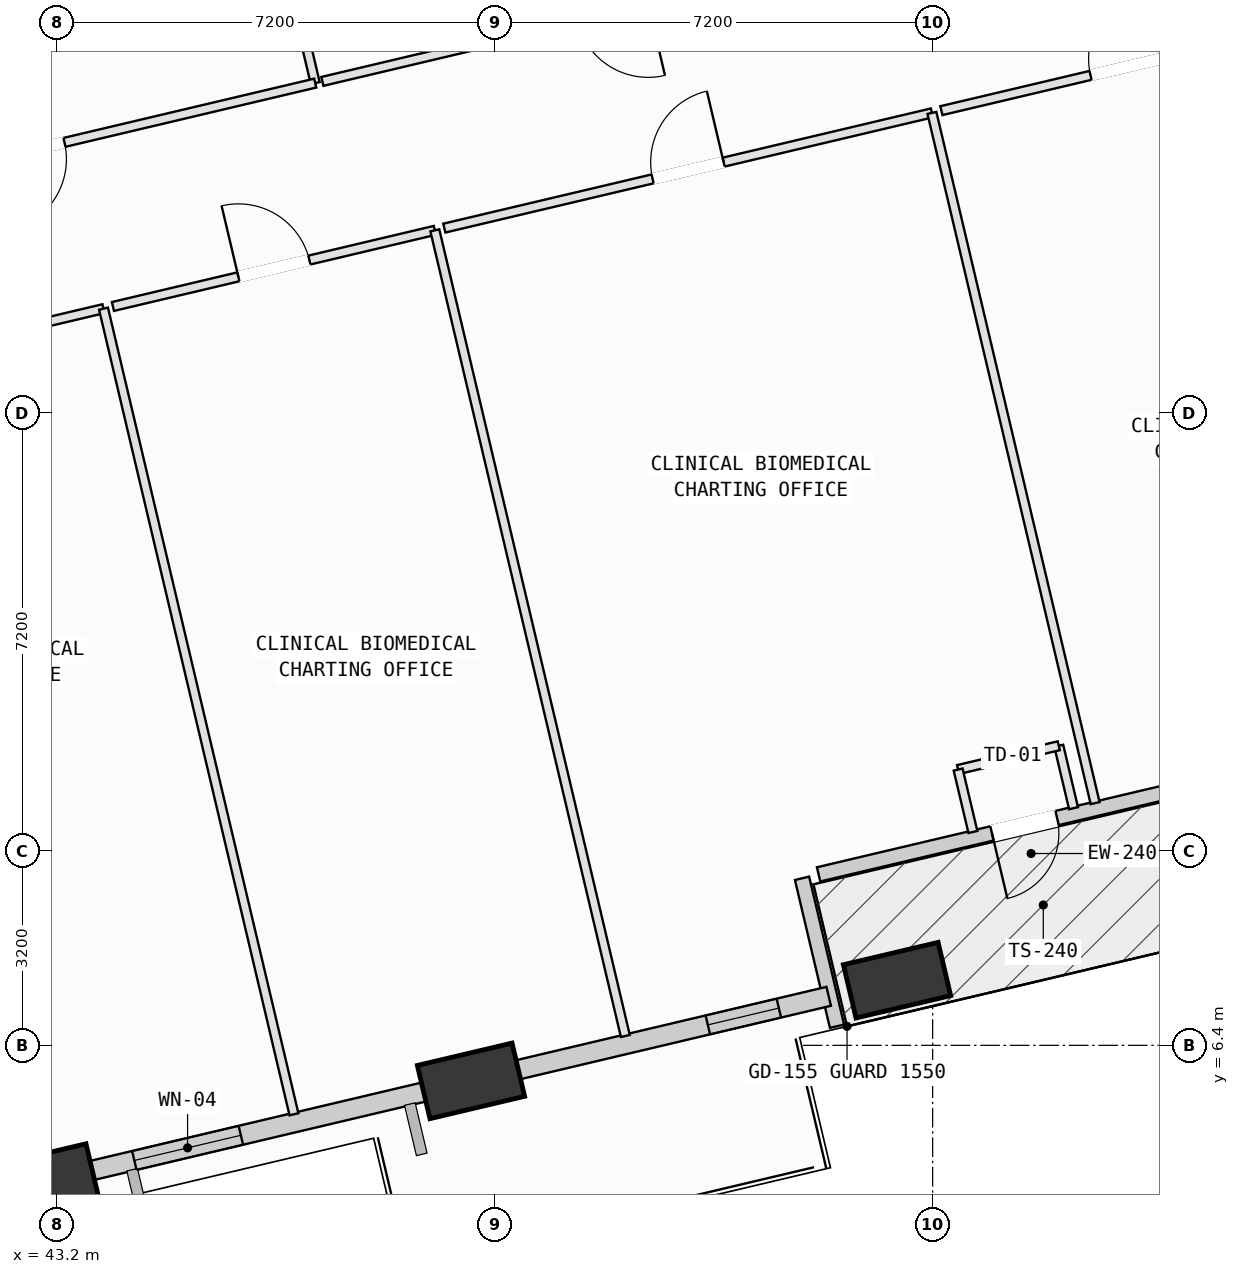
"""IFC4 building model, lengths in metres.
Left out: names, types, materials, properties, quantities, classifications, styles, units other than length and angle.
Written with IfcOpenShell. Run it as: python <this file> out.ifc"""

import sys

from ifc_helpers import new_model, si_unit, direction, frame, frame_2d, origin, origin_2d, place, context, subcontext, project, spatial, rectangle, extrude, element, fill, save


model = new_model("IFC4")
c1 = context("Model", 3, precision=1e-05, world=origin(), true_north=direction((0.0, 1.0)))
c2 = subcontext(c1, "Body", "Model", "MODEL_VIEW")
j1 = project(units=[si_unit("LENGTHUNIT", "METRE"), si_unit("PLANEANGLEUNIT", "RADIAN")], contexts=[c1])
p1 = place(None, origin())
s1 = spatial("IfcSite", under=j1, at=p1, CompositionType="ELEMENT")
p2 = place(p1, origin())
s2 = spatial("IfcBuilding", under=s1, at=p2, CompositionType="ELEMENT")
p3 = place(p2, frame((0.0, 0.0, 79.0)))
s3 = spatial("IfcBuildingStorey", under=s2, at=p3, CompositionType="ELEMENT", Elevation=79.0)
p4 = place(p3, frame((43.001, 4.159, 0.002), z_axis=(0.084881179717, 0.039446599156, 0.995609939256), x_axis=(-0.617843296681, 0.786006368536, 0.021532518815)))
e1 = element("IfcColumn", 1, at=p4, inside=s3, PredefinedType="COLUMN", context=c2, shape_type="SweptSolid", body=[
    extrude(rectangle(XDim=1.6, YDim=0.9, at=origin_2d()), origin(), (0.0, 0.0, 1.0), 3.955),
])
p5 = place(p3, frame((50.008, 5.815, 0.002), z_axis=(0.077702832451, 0.068314254921, 0.994633315551), x_axis=(-0.814413568404, 0.579796535896, 0.023801608418)))
e2 = element("IfcColumn", 2, at=p5, inside=s3, PredefinedType="COLUMN", context=c2, shape_type="SweptSolid", body=[
    extrude(rectangle(XDim=1.6, YDim=0.9, at=origin_2d()), origin(), (0.0, 0.0, 1.0), 3.953),
])
p6 = place(p3, frame((57.014, 7.472, 0.002), z_axis=(0.070529421211, 0.096923867186, 0.992789688058), x_axis=(-0.921275075012, 0.387932734604, 0.027575887724)))
e3 = element("IfcColumn", 3, at=p6, inside=s3, PredefinedType="COLUMN", context=c2, shape_type="SweptSolid", body=[
    extrude(rectangle(XDim=1.6, YDim=0.9, at=origin_2d()), origin(), (0.0, 0.0, 1.0), 3.95),
])
p7 = place(p3, frame((62.498, 10.813, 0.0), z_axis=(0.0, 0.0, 1.0), x_axis=(-0.973180186611, -0.230044179209, 0.0)))
e4 = element("IfcWall", 4, at=p7, inside=s3, PredefinedType="SOLIDWALL", context=c2, shape_type="SweptSolid", body=[
    extrude(rectangle(XDim=6.96, YDim=0.24, at=frame_2d((3.48, 0.0))), origin(), (0.0, 0.0, 1.0), 3.085),
])
p8 = place(p7, frame((2.93, 0.0, 0.0)))
e5 = element("IfcOpeningElement", 5, at=p8, cuts=e4, PredefinedType="OPENING", context=c2, shape_type="SweptSolid", body=[
    extrude(rectangle(XDim=1.1, YDim=2.15, at=frame_2d((0.55, 1.075))), frame((0.0, 0.13, 0.0), z_axis=(0.0, -1.0, 0.0), x_axis=(1.0, 0.0, 0.0)), (0.0, 0.0, 1.0), 0.26),
])
p9 = place(p3, frame((55.452, 9.147, 0.0), z_axis=(0.0, 0.0, 1.0), x_axis=(0.230084311785, -0.97317069904, 0.0)))
e6 = element("IfcWall", 6, at=p9, inside=s3, PredefinedType="SOLIDWALL", context=c2, shape_type="SweptSolid", body=[
    extrude(rectangle(XDim=2.5, YDim=0.24, at=frame_2d((1.25, 0.0))), origin(), (0.0, 0.0, 1.0), 3.085),
])
p10 = place(p3, frame((49.602, 5.719, 0.0), z_axis=(0.0, 0.0, 1.0), x_axis=(-0.973177813983, -0.230054216157, 0.0)))
e7 = element("IfcWall", 7, at=p10, inside=s3, PredefinedType="SOLIDWALL", context=c2, shape_type="SweptSolid", body=[
    extrude(rectangle(XDim=5.993, YDim=0.32, at=frame_2d((2.996, 0.0))), origin(), (0.0, 0.0, 1.0), 3.085),
])
p11 = place(p10, frame((3.473, 0.0, 0.75)))
e8 = element("IfcOpeningElement", 8, at=p11, cuts=e7, PredefinedType="OPENING", context=c2, shape_type="SweptSolid", body=[
    extrude(rectangle(XDim=1.8, YDim=2.05, at=frame_2d((0.9, 1.025))), frame((0.0, 0.17, 0.0), z_axis=(0.0, -1.0, 0.0), x_axis=(1.0, 0.0, 0.0)), (0.0, 0.0, 1.0), 0.34),
])
p12 = place(p3, frame((55.89, 7.206, 0.0), z_axis=(0.0, 0.0, 1.0), x_axis=(-0.973176868971, -0.23005821372, 0.0)))
e9 = element("IfcWall", 9, at=p12, inside=s3, PredefinedType="SOLIDWALL", context=c2, shape_type="SweptSolid", body=[
    extrude(rectangle(XDim=5.261, YDim=0.32, at=frame_2d((2.631, 0.0))), origin(), (0.0, 0.0, 1.0), 3.085),
])
p13 = place(p12, frame((0.843, 0.0, 0.75)))
e10 = element("IfcOpeningElement", 10, at=p13, cuts=e9, PredefinedType="OPENING", context=c2, shape_type="SweptSolid", body=[
    extrude(rectangle(XDim=1.2, YDim=1.75, at=frame_2d((0.6, 0.875))), frame((0.0, 0.17, 0.0), z_axis=(0.0, -1.0, 0.0), x_axis=(1.0, 0.0, 0.0)), (0.0, 0.0, 1.0), 0.34),
])
p14 = place(p3, frame((36.5, 16.751, 0.0), z_axis=(0.0, 0.0, 1.0), x_axis=(0.973158565996, 0.230135623987, 0.0)))
e11 = element("IfcWall", 11, at=p14, inside=s3, PredefinedType="PARTITIONING", context=c2, shape_type="SweptSolid", body=[
    extrude(rectangle(XDim=7.67, YDim=0.15, at=frame_2d((3.835, 0.0))), origin(), (0.0, 0.0, 1.0), 3.7),
])
p15 = place(p14, frame((3.235, 0.0, 0.0)))
e12 = element("IfcOpeningElement", 12, at=p15, cuts=e11, PredefinedType="OPENING", context=c2, shape_type="SweptSolid", body=[
    extrude(rectangle(XDim=1.2, YDim=2.15, at=frame_2d((0.6, 1.075))), frame((0.0, 0.085, 0.0), z_axis=(0.0, -1.0, 0.0), x_axis=(1.0, 0.0, 0.0)), (0.0, 0.0, 1.0), 0.17),
])
p16 = place(p3, frame((43.964, 18.516, 0.0), z_axis=(0.0, 0.0, 1.0), x_axis=(0.230026689043, -0.97318432084, 0.0)))
e13 = element("IfcWall", 13, at=p16, inside=s3, PredefinedType="PARTITIONING", context=c2, shape_type="SweptSolid", body=[
    extrude(rectangle(XDim=13.615, YDim=0.15, at=frame_2d((6.808, 0.0))), origin(), (0.0, 0.0, 1.0), 3.7),
])
p17 = place(p3, frame((43.823, 4.117, 0.0), z_axis=(0.0, 0.0, 1.0), x_axis=(-0.973197713675, -0.229970019998, 0.0)))
e14 = element("IfcWall", 14, at=p17, inside=s3, PredefinedType="PARTITIONING", context=c2, shape_type="SweptSolid", body=[
    extrude(rectangle(XDim=1.213, YDim=0.15, at=frame_2d((0.607, 0.0))), origin(), (0.0, 0.0, 1.0), 3.085),
])
p18 = place(p3, frame((44.119, 18.552, 0.0), z_axis=(0.0, 0.0, 1.0), x_axis=(0.973159948665, 0.230129777116, 0.0)))
e15 = element("IfcWall", 15, at=p18, inside=s3, PredefinedType="PARTITIONING", context=c2, shape_type="SweptSolid", body=[
    extrude(rectangle(XDim=5.44, YDim=0.15, at=frame_2d((2.72, 0.0))), origin(), (0.0, 0.0, 1.0), 3.7),
])
p19 = place(p18, frame((2.12, 0.0, 0.0)))
e16 = element("IfcOpeningElement", 16, at=p19, cuts=e15, PredefinedType="OPENING", context=c2, shape_type="SweptSolid", body=[
    extrude(rectangle(XDim=1.2, YDim=2.15, at=frame_2d((0.6, 1.075))), frame((0.0, 0.085, 0.0), z_axis=(0.0, -1.0, 0.0), x_axis=(1.0, 0.0, 0.0)), (0.0, 0.0, 1.0), 0.17),
])
p20 = place(p3, frame((49.413, 19.804, 0.0), z_axis=(0.0, 0.0, 1.0), x_axis=(0.230094618591, -0.97316826217, 0.0)))
e17 = element("IfcWall", 17, at=p20, inside=s3, PredefinedType="PARTITIONING", context=c2, shape_type="SweptSolid", body=[
    extrude(rectangle(XDim=13.615, YDim=0.15, at=frame_2d((6.808, 0.0))), origin(), (0.0, 0.0, 1.0), 3.7),
])
p21 = place(p3, frame((50.823, 5.772, 0.0), z_axis=(0.0, 0.0, 1.0), x_axis=(-0.973219377469, -0.229878322855, 0.0)))
e18 = element("IfcWall", 18, at=p21, inside=s3, PredefinedType="PARTITIONING", context=c2, shape_type="SweptSolid", body=[
    extrude(rectangle(XDim=1.2, YDim=0.15, at=frame_2d((0.6, 0.0))), origin(), (0.0, 0.0, 1.0), 3.085),
])
p22 = place(p3, frame((49.569, 19.841, 0.0), z_axis=(0.0, 0.0, 1.0), x_axis=(0.973193656839, 0.229987187224, 0.0)))
e19 = element("IfcWall", 19, at=p22, inside=s3, PredefinedType="PARTITIONING", context=c2, shape_type="SweptSolid", body=[
    extrude(rectangle(XDim=8.24, YDim=0.15, at=frame_2d((4.12, 0.0))), origin(), (0.0, 0.0, 1.0), 3.7),
])
p23 = place(p22, frame((3.52, 0.0, 0.0)))
e20 = element("IfcOpeningElement", 20, at=p23, cuts=e19, PredefinedType="OPENING", context=c2, shape_type="SweptSolid", body=[
    extrude(rectangle(XDim=1.2, YDim=2.15, at=frame_2d((0.6, 1.075))), frame((0.0, 0.085, 0.0), z_axis=(0.0, -1.0, 0.0), x_axis=(1.0, 0.0, 0.0)), (0.0, 0.0, 1.0), 0.17),
])
p24 = place(p3, frame((57.588, 21.736, 0.0), z_axis=(0.0, 0.0, 1.0), x_axis=(0.230096091154, -0.973167913998, 0.0)))
e21 = element("IfcWall", 21, at=p24, inside=s3, PredefinedType="PARTITIONING", context=c2, shape_type="SweptSolid", body=[
    extrude(rectangle(XDim=11.665, YDim=0.15, at=frame_2d((5.833, 0.0))), origin(), (0.0, 0.0, 1.0), 3.7),
])
p25 = place(p3, frame((59.917, 10.3, 0.0), z_axis=(0.0, 0.0, 1.0), x_axis=(-0.230212703989, 0.97314033465, 0.0)))
e22 = element("IfcWall", 22, at=p25, inside=s3, PredefinedType="PARTITIONING", context=c2, shape_type="SweptSolid", body=[
    extrude(rectangle(XDim=1.055, YDim=0.15, at=frame_2d((0.528, 0.0))), origin(), (0.0, 0.0, 1.0), 3.7),
])
p26 = place(p3, frame((59.674, 11.327, 0.0), z_axis=(0.0, 0.0, 1.0), x_axis=(-0.973226668125, -0.229847454738, 0.0)))
e23 = element("IfcWall", 23, at=p26, inside=s3, PredefinedType="PARTITIONING", context=c2, shape_type="SweptSolid", body=[
    extrude(rectangle(XDim=1.7, YDim=0.15, at=frame_2d((0.85, 0.0))), origin(), (0.0, 0.0, 1.0), 3.7),
])
p27 = place(p3, frame((58.019, 10.936, 0.0), z_axis=(0.0, 0.0, 1.0), x_axis=(0.230160881779, -0.973152592607, 0.0)))
e24 = element("IfcWall", 24, at=p27, inside=s3, PredefinedType="PARTITIONING", context=c2, shape_type="SweptSolid", body=[
    extrude(rectangle(XDim=1.055, YDim=0.15, at=frame_2d((0.528, 0.0))), origin(), (0.0, 0.0, 1.0), 3.7),
])
p28 = place(p3, frame((57.744, 21.773, 0.0), z_axis=(0.0, 0.0, 1.0), x_axis=(0.973163112175, 0.230116399028, 0.0)))
e25 = element("IfcWall", 25, at=p28, inside=s3, PredefinedType="PARTITIONING", context=c2, shape_type="SweptSolid", body=[
    extrude(rectangle(XDim=6.24, YDim=0.15, at=frame_2d((3.12, 0.0))), origin(), (0.0, 0.0, 1.0), 3.7),
])
p29 = place(p28, frame((2.52, 0.0, 0.0)))
e26 = element("IfcOpeningElement", 26, at=p29, cuts=e25, PredefinedType="OPENING", context=c2, shape_type="SweptSolid", body=[
    extrude(rectangle(XDim=1.2, YDim=2.15, at=frame_2d((0.6, 1.075))), frame((0.0, 0.085, 0.0), z_axis=(0.0, -1.0, 0.0), x_axis=(1.0, 0.0, 0.0)), (0.0, 0.0, 1.0), 0.17),
])
p30 = place(p3, frame((46.479, 26.319, 0.0), z_axis=(0.0, 0.0, 1.0), x_axis=(0.229935488388, -0.973205872968, 0.0)))
e27 = element("IfcWall", 27, at=p30, inside=s3, PredefinedType="PARTITIONING", context=c2, shape_type="SweptSolid", body=[
    extrude(rectangle(XDim=4.206, YDim=0.15, at=frame_2d((2.103, 0.0))), origin(), (0.0, 0.0, 1.0), 3.7),
])
p31 = place(p3, frame((47.446, 22.226, 0.0), z_axis=(0.0, 0.0, 1.0), x_axis=(-0.973173725455, -0.230071510804, 0.0)))
e28 = element("IfcWall", 28, at=p31, inside=s3, PredefinedType="PARTITIONING", context=c2, shape_type="SweptSolid", body=[
    extrude(rectangle(XDim=9.676, YDim=0.15, at=frame_2d((4.838, 0.0))), origin(), (0.0, 0.0, 1.0), 3.7),
])
p32 = place(p31, frame((4.238, 0.0, 0.0)))
e29 = element("IfcOpeningElement", 29, at=p32, cuts=e28, PredefinedType="OPENING", context=c2, shape_type="SweptSolid", body=[
    extrude(rectangle(XDim=1.2, YDim=2.15, at=frame_2d((0.6, 1.075))), frame((0.0, 0.085, 0.0), z_axis=(0.0, -1.0, 0.0), x_axis=(1.0, 0.0, 0.0)), (0.0, 0.0, 1.0), 0.17),
])
p33 = place(p3, frame((57.113, 24.511, 0.0), z_axis=(0.0, 0.0, 1.0), x_axis=(-0.973189270561, -0.230005747024, 0.0)))
e30 = element("IfcWall", 30, at=p33, inside=s3, PredefinedType="PARTITIONING", context=c2, shape_type="SweptSolid", body=[
    extrude(rectangle(XDim=9.813, YDim=0.15, at=frame_2d((4.907, 0.0))), origin(), (0.0, 0.0, 1.0), 3.7),
])
p34 = place(p33, frame((4.306, 0.0, 0.0)))
e31 = element("IfcOpeningElement", 31, at=p34, cuts=e30, PredefinedType="OPENING", context=c2, shape_type="SweptSolid", body=[
    extrude(rectangle(XDim=1.2, YDim=2.15, at=frame_2d((0.6, 1.075))), frame((0.0, 0.085, 0.0), z_axis=(0.0, -1.0, 0.0), x_axis=(1.0, 0.0, 0.0)), (0.0, 0.0, 1.0), 0.17),
])
p35 = place(p8, origin())
e32 = element("IfcDoor", 32, at=p35, inside=s3, OperationType="SINGLE_SWING_RIGHT", PredefinedType="DOOR", context=c2, shape_type="SweptSolid", body=[
    extrude(rectangle(XDim=1.1, YDim=2.15, at=frame_2d((0.55, 1.075))), frame((0.0, 0.025, 0.0), z_axis=(0.0, -1.0, 0.0), x_axis=(1.0, 0.0, 0.0)), (0.0, 0.0, 1.0), 0.05),
])
fill(e5, e32)
p36 = place(p11, origin())
e33 = element("IfcWindow", 33, at=p36, inside=s3, PartitioningType="SINGLE_PANEL", PredefinedType="WINDOW", context=c2, shape_type="SweptSolid", body=[
    extrude(rectangle(XDim=1.8, YDim=2.05, at=frame_2d((0.9, 1.025))), frame((0.0, 0.03, 0.0), z_axis=(0.0, -1.0, 0.0), x_axis=(1.0, 0.0, 0.0)), (0.0, 0.0, 1.0), 0.06),
])
fill(e8, e33)
p37 = place(p13, origin())
e34 = element("IfcWindow", 34, at=p37, inside=s3, PartitioningType="SINGLE_PANEL", PredefinedType="WINDOW", context=c2, shape_type="SweptSolid", body=[
    extrude(rectangle(XDim=1.2, YDim=1.75, at=frame_2d((0.6, 0.875))), frame((0.0, 0.03, 0.0), z_axis=(0.0, -1.0, 0.0), x_axis=(1.0, 0.0, 0.0)), (0.0, 0.0, 1.0), 0.06),
])
fill(e10, e34)
p38 = place(p19, origin())
e35 = element("IfcDoor", 35, at=p38, inside=s3, OperationType="SINGLE_SWING_LEFT", PredefinedType="DOOR", context=c2, shape_type="SweptSolid", body=[
    extrude(rectangle(XDim=1.2, YDim=2.15, at=frame_2d((0.6, 1.075))), frame((0.0, 0.025, 0.0), z_axis=(0.0, -1.0, 0.0), x_axis=(1.0, 0.0, 0.0)), (0.0, 0.0, 1.0), 0.05),
])
fill(e16, e35)
p39 = place(p23, origin())
e36 = element("IfcDoor", 36, at=p39, inside=s3, OperationType="SINGLE_SWING_RIGHT", PredefinedType="DOOR", context=c2, shape_type="SweptSolid", body=[
    extrude(rectangle(XDim=1.2, YDim=2.15, at=frame_2d((0.6, 1.075))), frame((0.0, 0.025, 0.0), z_axis=(0.0, -1.0, 0.0), x_axis=(1.0, 0.0, 0.0)), (0.0, 0.0, 1.0), 0.05),
])
fill(e20, e36)
p40 = place(p29, origin())
e37 = element("IfcDoor", 37, at=p40, inside=s3, OperationType="SINGLE_SWING_RIGHT", PredefinedType="DOOR", context=c2, shape_type="SweptSolid", body=[
    extrude(rectangle(XDim=1.2, YDim=2.15, at=frame_2d((0.6, 1.075))), frame((0.0, 0.025, 0.0), z_axis=(0.0, -1.0, 0.0), x_axis=(1.0, 0.0, 0.0)), (0.0, 0.0, 1.0), 0.05),
])
fill(e26, e37)
p41 = place(p32, origin())
e38 = element("IfcDoor", 38, at=p41, inside=s3, OperationType="SINGLE_SWING_RIGHT", PredefinedType="DOOR", context=c2, shape_type="SweptSolid", body=[
    extrude(rectangle(XDim=1.2, YDim=2.15, at=frame_2d((0.6, 1.075))), frame((0.0, 0.025, 0.0), z_axis=(0.0, -1.0, 0.0), x_axis=(1.0, 0.0, 0.0)), (0.0, 0.0, 1.0), 0.05),
])
fill(e29, e38)
save(model, sys.argv[1])
